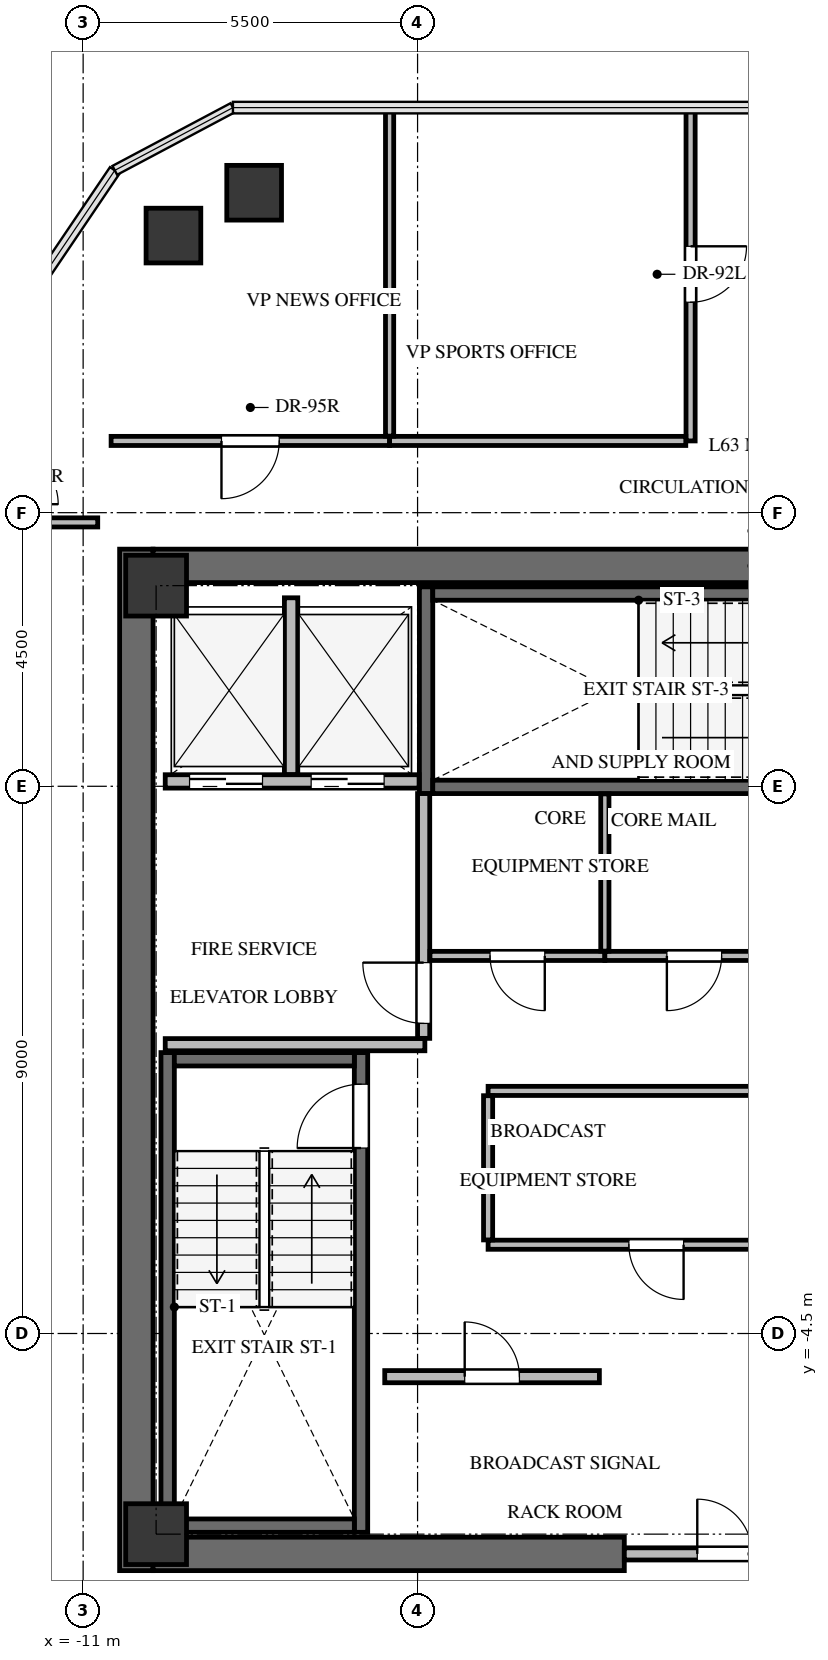
"""IFC4 building model, lengths in metres.
Left out: names, types, materials, properties, quantities, classifications, styles, units other than length and angle.
Written with IfcOpenShell. Run it as: python <this file> out.ifc"""

import sys

from ifc_helpers import new_model, si_unit, direction, frame, frame_2d, origin, origin_2d, place, context, subcontext, project, spatial, rectangle, extrude, source, transform, mapped, element, fill, save


model = new_model("IFC4")
c1 = context("Model", 3, precision=1e-05, world=origin(), true_north=direction((0.0, 1.0)))
c2 = subcontext(c1, "Body", "Model", "MODEL_VIEW")
j1 = project(units=[si_unit("LENGTHUNIT", "METRE"), si_unit("PLANEANGLEUNIT", "RADIAN")], contexts=[c1])
p1 = place(None, origin())
s1 = spatial("IfcSite", under=j1, at=p1, CompositionType="ELEMENT")
p2 = place(p1, origin())
s2 = spatial("IfcBuilding", under=s1, at=p2, CompositionType="ELEMENT")
p3 = place(p2, frame((0.0, 0.0, 228.2)))
s3 = spatial("IfcBuildingStorey", under=s2, at=p3, CompositionType="ELEMENT", Elevation=228.2)
p4 = place(p3, frame((-10.125, -8.4, 0.0), z_axis=(0.0, 0.0, 1.0), x_axis=(0.0, 1.0, 0.0)))
e1 = element("IfcWall", 1, at=p4, inside=s3, PredefinedType="SHEAR", context=c2, shape_type="SweptSolid", body=[
    extrude(rectangle(XDim=16.8, YDim=0.55, at=frame_2d((8.4, 0.0))), origin(), (0.0, 0.0, 1.0), 3.3),
])
p5 = place(p3, frame((-9.85, -8.125, 0.0), z_axis=(0.0, 0.0, 1.0), x_axis=(1.0, 0.0, 0.0)))
e2 = element("IfcWall", 2, at=p5, inside=s3, PredefinedType="SHEAR", context=c2, shape_type="SweptSolid", body=[
    extrude(rectangle(XDim=7.75, YDim=0.55, at=frame_2d((3.875, 0.0))), origin(), (0.0, 0.0, 1.0), 3.3),
])
p6 = place(p3, frame((-9.85, 8.125, 0.0), z_axis=(0.0, 0.0, 1.0), x_axis=(1.0, 0.0, 0.0)))
e3 = element("IfcWall", 3, at=p6, inside=s3, PredefinedType="SHEAR", context=c2, shape_type="SweptSolid", body=[
    extrude(rectangle(XDim=19.7, YDim=0.55, at=frame_2d((9.85, 0.0))), origin(), (0.0, 0.0, 1.0), 3.3),
])
p7 = place(p3, frame((-6.43, -7.77, -0.24), z_axis=(0.0, 0.0, 1.0), x_axis=(0.0, 1.0, 0.0)))
e4 = element("IfcWall", 4, at=p7, inside=s3, PredefinedType="SHEAR", context=c2, shape_type="SweptSolid", body=[
    extrude(rectangle(XDim=7.89, YDim=0.22, at=frame_2d((3.945, 0.0))), origin(), (0.0, 0.0, 1.0), 3.3),
])
p8 = place(p7, frame((6.32, 0.0, 0.0)))
e5 = element("IfcOpeningElement", 5, at=p8, cuts=e4, PredefinedType="OPENING", context=c2, shape_type="SweptSolid", body=[
    extrude(rectangle(XDim=1.05, YDim=2.15, at=frame_2d((0.525, 1.075))), frame((0.0, 0.12, 0.0), z_axis=(0.0, -1.0, 0.0), x_axis=(1.0, 0.0, 0.0)), (0.0, 0.0, 1.0), 0.24),
])
p9 = place(p3, frame((-9.61, 0.12, -0.24), z_axis=(0.0, 0.0, 1.0), x_axis=(0.0, -1.0, 0.0)))
e6 = element("IfcWall", 6, at=p9, inside=s3, PredefinedType="SHEAR", context=c2, shape_type="SweptSolid", body=[
    extrude(rectangle(XDim=7.89, YDim=0.22, at=frame_2d((3.945, 0.0))), origin(), (0.0, 0.0, 1.0), 3.3),
])
for number, where, z_axis, x_axis in (
    (7, (-9.5, -7.66, -0.24), (0.0, 0.0, 1.0), (1.0, 0.0, 0.0)),
    (8, (-6.54, 0.01, -0.24), (0.0, 0.0, 1.0), (-1.0, 0.0, 0.0)),
):
    element("IfcWall", number, at=place(p3, frame(where, z_axis=z_axis, x_axis=x_axis)), inside=s3, PredefinedType="SHEAR", context=c2, shape_type="SweptSolid", body=[
        extrude(rectangle(XDim=2.96, YDim=0.22, at=frame_2d((1.48, 0.0))), origin(), (0.0, 0.0, 1.0), 3.3),
    ])
p10 = place(p3, frame((-5.36, 7.78, -0.24), z_axis=(0.0, 0.0, 1.0), x_axis=(0.0, -1.0, 0.0)))
e9 = element("IfcWall", 9, at=p10, inside=s3, PredefinedType="SHEAR", context=c2, shape_type="SweptSolid", body=[
    extrude(rectangle(XDim=3.4, YDim=0.22, at=frame_2d((1.7, 0.0))), origin(), (0.0, 0.0, 1.0), 3.3),
])
p11 = place(p3, frame((-5.25, 4.49, -0.24), z_axis=(0.0, 0.0, 1.0), x_axis=(1.0, 0.0, 0.0)))
e10 = element("IfcWall", 10, at=p11, inside=s3, PredefinedType="SHEAR", context=c2, shape_type="SweptSolid", body=[
    extrude(rectangle(XDim=7.35, YDim=0.22, at=frame_2d((3.675, 0.0))), origin(), (0.0, 0.0, 1.0), 3.3),
])
p12 = place(p11, frame((5.85, 0.0, 0.0)))
e11 = element("IfcOpeningElement", 11, at=p12, cuts=e10, PredefinedType="OPENING", context=c2, shape_type="SweptSolid", body=[
    extrude(rectangle(XDim=1.05, YDim=2.15, at=frame_2d((0.525, 1.075))), frame((0.0, 0.12, 0.0), z_axis=(0.0, -1.0, 0.0), x_axis=(1.0, 0.0, 0.0)), (0.0, 0.0, 1.0), 0.24),
])
p13 = place(p3, frame((2.1, 7.67, -0.24), z_axis=(0.0, 0.0, 1.0), x_axis=(-1.0, 0.0, 0.0)))
e12 = element("IfcWall", 12, at=p13, inside=s3, PredefinedType="SHEAR", context=c2, shape_type="SweptSolid", body=[
    extrude(rectangle(XDim=7.35, YDim=0.22, at=frame_2d((3.675, 0.0))), origin(), (0.0, 0.0, 1.0), 3.3),
])
m1 = source(origin(), c2, "Body", "SweptSolid", [
    extrude(rectangle(XDim=1.0, YDim=1.0, at=origin_2d()), origin(), (0.0, 0.0, 1.0), 3.3),
])
for number, where, z_axis, x_axis in (
    (13, (-9.8, -7.8, -0.24), (0.0, 0.0, 1.0), (1.0, 0.0, 0.0)),
    (14, (-9.8, 7.8, -0.24), (0.0, 0.0, 1.0), (1.0, 0.0, 0.0)),
):
    element("IfcColumn", number, at=place(p3, frame(where, z_axis=z_axis, x_axis=x_axis)), inside=s3, PredefinedType="COLUMN", context=c2, shape_type="MappedRepresentation", body=[
        mapped(m1, transform((0.0, 0.0, 0.0), x_axis=(1.0, 0.0, 0.0), y_axis=(0.0, 1.0, 0.0), z_axis=(0.0, 0.0, 1.0), scale=1.0)),
    ])
m2 = source(origin(), c2, "Body", "SweptSolid", [
    extrude(rectangle(XDim=0.9, YDim=0.9, at=origin_2d()), origin(), (0.0, 0.0, 1.0), 3.3),
])
for number, where, z_axis, x_axis in (
    (15, (-9.515, 13.557, -0.24), (0.0, 0.0, 1.0), (1.0, 0.0, 0.0)),
    (16, (-8.188, 14.262, -0.24), (0.0, 0.0, 1.0), (1.0, 0.0, 0.0)),
):
    element("IfcColumn", number, at=place(p3, frame(where, z_axis=z_axis, x_axis=x_axis)), inside=s3, PredefinedType="COLUMN", context=c2, shape_type="MappedRepresentation", body=[
        mapped(m2, transform((0.0, 0.0, 0.0), x_axis=(1.0, 0.0, 0.0), y_axis=(0.0, 1.0, 0.0), z_axis=(0.0, 0.0, 1.0), scale=1.0)),
    ])
p14 = place(p3, frame((-2.1, -8.125, 0.0), z_axis=(0.0, 0.0, 1.0), x_axis=(1.0, 0.0, 0.0)))
e17 = element("IfcWall", 17, at=p14, inside=s3, PredefinedType="SOLIDWALL", context=c2, shape_type="SweptSolid", body=[
    extrude(rectangle(XDim=4.2, YDim=0.2, at=frame_2d((2.1, 0.0))), origin(), (0.0, 0.0, 1.0), 3.045),
])
p15 = place(p14, frame((1.2, 0.0, 0.0)))
e18 = element("IfcOpeningElement", 18, at=p15, cuts=e17, PredefinedType="OPENING", context=c2, shape_type="SweptSolid", body=[
    extrude(rectangle(XDim=1.8, YDim=2.15, at=frame_2d((0.9, 1.075))), frame((0.0, 0.11, 0.0), z_axis=(0.0, -1.0, 0.0), x_axis=(1.0, 0.0, 0.0)), (0.0, 0.0, 1.0), 0.22),
])
p16 = place(p3, frame((-9.65, 4.58, 0.0), z_axis=(0.0, 0.0, 1.0), x_axis=(1.0, 0.0, 0.0)))
e19 = element("IfcWall", 19, at=p16, inside=s3, PredefinedType="SOLIDWALL", context=c2, shape_type="SweptSolid", body=[
    extrude(rectangle(XDim=4.175, YDim=0.22, at=frame_2d((2.087, 0.0))), origin(), (0.0, 0.0, 1.0), 3.045),
])
p17 = place(p16, frame((0.4, 0.0, 0.0)))
e20 = element("IfcOpeningElement", 20, at=p17, cuts=e19, PredefinedType="OPENING", context=c2, shape_type="SweptSolid", body=[
    extrude(rectangle(XDim=1.2, YDim=2.15, at=frame_2d((0.6, 1.075))), frame((0.0, 0.12, 0.0), z_axis=(0.0, -1.0, 0.0), x_axis=(1.0, 0.0, 0.0)), (0.0, 0.0, 1.0), 0.24),
])
p18 = place(p16, frame((2.4, 0.0, 0.0)))
e21 = element("IfcOpeningElement", 21, at=p18, cuts=e19, PredefinedType="OPENING", context=c2, shape_type="SweptSolid", body=[
    extrude(rectangle(XDim=1.2, YDim=2.15, at=frame_2d((0.6, 1.075))), frame((0.0, 0.12, 0.0), z_axis=(0.0, -1.0, 0.0), x_axis=(1.0, 0.0, 0.0)), (0.0, 0.0, 1.0), 0.24),
])
p19 = place(p3, frame((-7.58, 4.694, 0.0), z_axis=(0.0, 0.0, 1.0), x_axis=(0.0, 1.0, 0.0)))
e22 = element("IfcWall", 22, at=p19, inside=s3, PredefinedType="SOLIDWALL", context=c2, shape_type="SweptSolid", body=[
    extrude(rectangle(XDim=2.906, YDim=0.22, at=frame_2d((1.453, 0.0))), origin(), (0.0, 0.0, 1.0), 3.045),
])
p20 = place(p3, frame((-9.65, 0.25, 0.0), z_axis=(0.0, 0.0, 1.0), x_axis=(1.0, 0.0, 0.0)))
e23 = element("IfcWall", 23, at=p20, inside=s3, PredefinedType="SOLIDWALL", context=c2, shape_type="SweptSolid", body=[
    extrude(rectangle(XDim=4.27, YDim=0.2, at=frame_2d((2.135, 0.0))), origin(), (0.0, 0.0, 1.0), 3.045),
])
p21 = place(p3, frame((-5.4, 0.354, 0.0), z_axis=(0.0, 0.0, 1.0), x_axis=(0.0, 1.0, 0.0)))
e24 = element("IfcWall", 24, at=p21, inside=s3, PredefinedType="SOLIDWALL", context=c2, shape_type="SweptSolid", body=[
    extrude(rectangle(XDim=4.026, YDim=0.2, at=frame_2d((2.013, 0.0))), origin(), (0.0, 0.0, 1.0), 3.045),
])
p22 = place(p21, frame((0.246, 0.0, 0.0)))
e25 = element("IfcOpeningElement", 25, at=p22, cuts=e24, PredefinedType="OPENING", context=c2, shape_type="SweptSolid", body=[
    extrude(rectangle(XDim=1.0, YDim=2.15, at=frame_2d((0.5, 1.075))), frame((0.0, 0.11, 0.0), z_axis=(0.0, -1.0, 0.0), x_axis=(1.0, 0.0, 0.0)), (0.0, 0.0, 1.0), 0.22),
])
p23 = place(p3, frame((-6.04, -5.21, 0.0), z_axis=(0.0, 0.0, 1.0), x_axis=(1.0, 0.0, 0.0)))
e26 = element("IfcWall", 26, at=p23, inside=s3, PredefinedType="SOLIDWALL", context=c2, shape_type="SweptSolid", body=[
    extrude(rectangle(XDim=3.53, YDim=0.2, at=frame_2d((1.765, 0.0))), origin(), (0.0, 0.0, 1.0), 3.045),
])
p24 = place(p23, frame((1.315, 0.0, 0.0)))
e27 = element("IfcOpeningElement", 27, at=p24, cuts=e26, PredefinedType="OPENING", context=c2, shape_type="SweptSolid", body=[
    extrude(rectangle(XDim=0.9, YDim=2.05, at=frame_2d((0.45, 1.025))), frame((0.0, 0.11, 0.0), z_axis=(0.0, -1.0, 0.0), x_axis=(1.0, 0.0, 0.0)), (0.0, 0.0, 1.0), 0.22),
])
p25 = place(p3, frame((1.19, -3.04, 0.0), z_axis=(0.0, 0.0, 1.0), x_axis=(-1.0, 0.0, 0.0)))
e28 = element("IfcWall", 28, at=p25, inside=s3, PredefinedType="PARTITIONING", context=c2, shape_type="SweptSolid", body=[
    extrude(rectangle(XDim=5.53, YDim=0.15, at=frame_2d((2.765, 0.0))), origin(), (0.0, 0.0, 1.0), 3.045),
])
p26 = place(p25, frame((2.315, 0.0, 0.0)))
e29 = element("IfcOpeningElement", 29, at=p26, cuts=e28, PredefinedType="OPENING", context=c2, shape_type="SweptSolid", body=[
    extrude(rectangle(XDim=0.9, YDim=2.05, at=frame_2d((0.45, 1.025))), frame((0.0, 0.085, 0.0), z_axis=(0.0, -1.0, 0.0), x_axis=(1.0, 0.0, 0.0)), (0.0, 0.0, 1.0), 0.17),
])
p27 = place(p3, frame((-4.34, -0.51, 0.0), z_axis=(0.0, 0.0, 1.0), x_axis=(1.0, 0.0, 0.0)))
e30 = element("IfcWall", 30, at=p27, inside=s3, PredefinedType="PARTITIONING", context=c2, shape_type="SweptSolid", body=[
    extrude(rectangle(XDim=5.53, YDim=0.15, at=frame_2d((2.765, 0.0))), origin(), (0.0, 0.0, 1.0), 3.045),
])
p28 = place(p3, frame((-4.34, -2.961, 0.0), z_axis=(0.0, 0.0, 1.0), x_axis=(0.0, 1.0, 0.0)))
e31 = element("IfcWall", 31, at=p28, inside=s3, PredefinedType="PARTITIONING", context=c2, shape_type="SweptSolid", body=[
    extrude(rectangle(XDim=2.372, YDim=0.15, at=frame_2d((1.186, 0.0))), origin(), (0.0, 0.0, 1.0), 3.045),
])
p29 = place(p3, frame((-2.42, 1.71, 0.0), z_axis=(0.0, 0.0, 1.0), x_axis=(-1.0, 0.0, 0.0)))
e32 = element("IfcWall", 32, at=p29, inside=s3, PredefinedType="PARTITIONING", context=c2, shape_type="SweptSolid", body=[
    extrude(rectangle(XDim=2.876, YDim=0.15, at=frame_2d((1.438, 0.0))), origin(), (0.0, 0.0, 1.0), 3.045),
])
p30 = place(p29, frame((0.988, 0.0, 0.0)))
e33 = element("IfcOpeningElement", 33, at=p30, cuts=e32, PredefinedType="OPENING", context=c2, shape_type="SweptSolid", body=[
    extrude(rectangle(XDim=0.9, YDim=2.05, at=frame_2d((0.45, 1.025))), frame((0.0, 0.085, 0.0), z_axis=(0.0, -1.0, 0.0), x_axis=(1.0, 0.0, 0.0)), (0.0, 0.0, 1.0), 0.17),
])
p31 = place(p3, frame((0.52, 1.71, 0.0), z_axis=(0.0, 0.0, 1.0), x_axis=(-1.0, 0.0, 0.0)))
e34 = element("IfcWall", 34, at=p31, inside=s3, PredefinedType="PARTITIONING", context=c2, shape_type="SweptSolid", body=[
    extrude(rectangle(XDim=2.94, YDim=0.15, at=frame_2d((1.47, 0.0))), origin(), (0.0, 0.0, 1.0), 3.045),
])
p32 = place(p31, frame((1.02, 0.0, 0.0)))
e35 = element("IfcOpeningElement", 35, at=p32, cuts=e34, PredefinedType="OPENING", context=c2, shape_type="SweptSolid", body=[
    extrude(rectangle(XDim=0.9, YDim=2.05, at=frame_2d((0.45, 1.025))), frame((0.0, 0.085, 0.0), z_axis=(0.0, -1.0, 0.0), x_axis=(1.0, 0.0, 0.0)), (0.0, 0.0, 1.0), 0.17),
])
p33 = place(p3, frame((-5.96, 10.18, 0.0), z_axis=(0.0, 0.0, 1.0), x_axis=(-1.0, 0.0, 0.0)))
e36 = element("IfcWall", 36, at=p33, inside=s3, PredefinedType="PARTITIONING", context=c2, shape_type="SweptSolid", body=[
    extrude(rectangle(XDim=4.58, YDim=0.15, at=frame_2d((2.29, 0.0))), origin(), (0.0, 0.0, 1.0), 2.301),
])
p34 = place(p33, frame((1.815, 0.0, 0.0)))
e37 = element("IfcOpeningElement", 37, at=p34, cuts=e36, PredefinedType="OPENING", context=c2, shape_type="SweptSolid", body=[
    extrude(rectangle(XDim=0.95, YDim=2.1, at=frame_2d((0.475, 1.05))), frame((0.0, 0.085, 0.0), z_axis=(0.0, -1.0, 0.0), x_axis=(1.0, 0.0, 0.0)), (0.0, 0.0, 1.0), 0.17),
])
p35 = place(p3, frame((-1.01, 15.662, 0.0), z_axis=(0.0, 0.0, 1.0), x_axis=(0.0, -1.0, 0.0)))
e38 = element("IfcWall", 38, at=p35, inside=s3, PredefinedType="PARTITIONING", context=c2, shape_type="SweptSolid", body=[
    extrude(rectangle(XDim=5.482, YDim=0.15, at=frame_2d((2.741, 0.0))), origin(), (0.0, 0.0, 1.0), 2.399),
])
p36 = place(p35, frame((2.281, 0.0, 0.0)))
e39 = element("IfcOpeningElement", 39, at=p36, cuts=e38, PredefinedType="OPENING", context=c2, shape_type="SweptSolid", body=[
    extrude(rectangle(XDim=0.92, YDim=2.1, at=frame_2d((0.46, 1.05))), frame((0.0, 0.085, 0.0), z_axis=(0.0, -1.0, 0.0), x_axis=(1.0, 0.0, 0.0)), (0.0, 0.0, 1.0), 0.17),
])
p37 = place(p3, frame((-1.089, 10.18, 0.0), z_axis=(0.0, 0.0, 1.0), x_axis=(-1.0, 0.0, 0.0)))
e40 = element("IfcWall", 40, at=p37, inside=s3, PredefinedType="PARTITIONING", context=c2, shape_type="SweptSolid", body=[
    extrude(rectangle(XDim=4.871, YDim=0.15, at=frame_2d((2.436, 0.0))), origin(), (0.0, 0.0, 1.0), 2.608),
])
p38 = place(p3, frame((-12.31, 8.84, 0.0), z_axis=(0.0, 0.0, 1.0), x_axis=(1.0, 0.0, 0.0)))
e41 = element("IfcWall", 41, at=p38, inside=s3, PredefinedType="PARTITIONING", context=c2, shape_type="SweptSolid", body=[
    extrude(rectangle(XDim=1.55, YDim=0.15, at=frame_2d((0.775, 0.0))), origin(), (0.0, 0.0, 1.0), 3.045),
])
p39 = place(p3, frame((-2.42, 4.375, 0.0), z_axis=(0.0, 0.0, 1.0), x_axis=(0.0, -1.0, 0.0)))
e42 = element("IfcWall", 42, at=p39, inside=s3, PredefinedType="PARTITIONING", context=c2, shape_type="SweptSolid", body=[
    extrude(rectangle(XDim=2.586, YDim=0.135, at=frame_2d((1.293, 0.0))), origin(), (0.0, 0.0, 1.0), 3.045),
])
p40 = place(p3, frame((-5.96, 15.662, 0.0), z_axis=(0.0, 0.0, 1.0), x_axis=(0.0, -1.0, 0.0)))
e43 = element("IfcWall", 43, at=p40, inside=s3, PredefinedType="PARTITIONING", context=c2, shape_type="SweptSolid", body=[
    extrude(rectangle(XDim=5.403, YDim=0.135, at=frame_2d((2.702, 0.0))), origin(), (0.0, 0.0, 1.0), 2.399),
])
m3 = source(origin(), c2, "Body", "SweptSolid", [
    extrude(rectangle(XDim=1.05, YDim=2.15, at=frame_2d((0.525, 1.075))), frame((0.0, 0.025, 0.0), z_axis=(0.0, -1.0, 0.0), x_axis=(1.0, 0.0, 0.0)), (0.0, 0.0, 1.0), 0.05),
])
p41 = place(p8, origin())
e44 = element("IfcDoor", 44, at=p41, inside=s3, OperationType="SINGLE_SWING_LEFT", PredefinedType="DOOR", context=c2, shape_type="MappedRepresentation", body=[
    mapped(m3, transform((0.0, 0.0, 0.0), x_axis=(1.0, 0.0, 0.0), y_axis=(0.0, 1.0, 0.0), z_axis=(0.0, 0.0, 1.0), scale=1.0)),
])
fill(e5, e44)
m4 = source(origin(), c2, "Body", "SweptSolid", [
    extrude(rectangle(XDim=1.8, YDim=2.15, at=frame_2d((0.9, 1.075))), frame((0.0, 0.025, 0.0), z_axis=(0.0, -1.0, 0.0), x_axis=(1.0, 0.0, 0.0)), (0.0, 0.0, 1.0), 0.05),
])
p42 = place(p15, origin())
e45 = element("IfcDoor", 45, at=p42, inside=s3, OperationType="DOUBLE_DOOR_SINGLE_SWING", PredefinedType="DOOR", context=c2, shape_type="MappedRepresentation", body=[
    mapped(m4, transform((0.0, 0.0, 0.0), x_axis=(1.0, 0.0, 0.0), y_axis=(0.0, 1.0, 0.0), z_axis=(0.0, 0.0, 1.0), scale=1.0)),
])
fill(e18, e45)
m5 = source(origin(), c2, "Body", "SweptSolid", [
    extrude(rectangle(XDim=1.2, YDim=2.15, at=frame_2d((0.6, 1.075))), frame((0.0, 0.025, 0.0), z_axis=(0.0, -1.0, 0.0), x_axis=(1.0, 0.0, 0.0)), (0.0, 0.0, 1.0), 0.05),
])
p43 = place(p17, origin())
e46 = element("IfcDoor", 46, at=p43, inside=s3, OperationType="DOUBLE_DOOR_SLIDING", PredefinedType="DOOR", context=c2, shape_type="MappedRepresentation", body=[
    mapped(m5, transform((0.0, 0.0, 0.0), x_axis=(1.0, 0.0, 0.0), y_axis=(0.0, 1.0, 0.0), z_axis=(0.0, 0.0, 1.0), scale=1.0)),
])
fill(e20, e46)
p44 = place(p18, origin())
e47 = element("IfcDoor", 47, at=p44, inside=s3, OperationType="DOUBLE_DOOR_SLIDING", PredefinedType="DOOR", context=c2, shape_type="MappedRepresentation", body=[
    mapped(m5, transform((0.0, 0.0, 0.0), x_axis=(1.0, 0.0, 0.0), y_axis=(0.0, 1.0, 0.0), z_axis=(0.0, 0.0, 1.0), scale=1.0)),
])
fill(e21, e47)
m6 = source(origin(), c2, "Body", "SweptSolid", [
    extrude(rectangle(XDim=1.0, YDim=2.15, at=frame_2d((0.5, 1.075))), frame((0.0, 0.025, 0.0), z_axis=(0.0, -1.0, 0.0), x_axis=(1.0, 0.0, 0.0)), (0.0, 0.0, 1.0), 0.05),
])
p45 = place(p22, origin())
e48 = element("IfcDoor", 48, at=p45, inside=s3, OperationType="SINGLE_SWING_RIGHT", PredefinedType="DOOR", context=c2, shape_type="MappedRepresentation", body=[
    mapped(m6, transform((0.0, 0.0, 0.0), x_axis=(1.0, 0.0, 0.0), y_axis=(0.0, 1.0, 0.0), z_axis=(0.0, 0.0, 1.0), scale=1.0)),
])
fill(e25, e48)
m7 = source(origin(), c2, "Body", "SweptSolid", [
    extrude(rectangle(XDim=0.9, YDim=2.05, at=frame_2d((0.45, 1.025))), frame((0.0, 0.025, 0.0), z_axis=(0.0, -1.0, 0.0), x_axis=(1.0, 0.0, 0.0)), (0.0, 0.0, 1.0), 0.05),
])
p46 = place(p24, origin())
e49 = element("IfcDoor", 49, at=p46, inside=s3, OperationType="SINGLE_SWING_LEFT", PredefinedType="DOOR", context=c2, shape_type="MappedRepresentation", body=[
    mapped(m7, transform((0.0, 0.0, 0.0), x_axis=(1.0, 0.0, 0.0), y_axis=(0.0, 1.0, 0.0), z_axis=(0.0, 0.0, 1.0), scale=1.0)),
])
fill(e27, e49)
p47 = place(p26, origin())
e50 = element("IfcDoor", 50, at=p47, inside=s3, OperationType="SINGLE_SWING_LEFT", PredefinedType="DOOR", context=c2, shape_type="MappedRepresentation", body=[
    mapped(m7, transform((0.0, 0.0, 0.0), x_axis=(1.0, 0.0, 0.0), y_axis=(0.0, 1.0, 0.0), z_axis=(0.0, 0.0, 1.0), scale=1.0)),
])
fill(e29, e50)
p48 = place(p30, origin())
e51 = element("IfcDoor", 51, at=p48, inside=s3, OperationType="SINGLE_SWING_LEFT", PredefinedType="DOOR", context=c2, shape_type="MappedRepresentation", body=[
    mapped(m7, transform((0.0, 0.0, 0.0), x_axis=(1.0, 0.0, 0.0), y_axis=(0.0, 1.0, 0.0), z_axis=(0.0, 0.0, 1.0), scale=1.0)),
])
fill(e33, e51)
m8 = source(origin(), c2, "Body", "SweptSolid", [
    extrude(rectangle(XDim=0.9, YDim=2.05, at=frame_2d((0.45, 1.025))), frame((0.0, 0.025, 0.0), z_axis=(0.0, -1.0, 0.0), x_axis=(1.0, 0.0, 0.0)), (0.0, 0.0, 1.0), 0.05),
])
p49 = place(p32, origin())
e52 = element("IfcDoor", 52, at=p49, inside=s3, OperationType="SINGLE_SWING_RIGHT", PredefinedType="DOOR", context=c2, shape_type="MappedRepresentation", body=[
    mapped(m8, transform((0.0, 0.0, 0.0), x_axis=(1.0, 0.0, 0.0), y_axis=(0.0, 1.0, 0.0), z_axis=(0.0, 0.0, 1.0), scale=1.0)),
])
fill(e35, e52)
m9 = source(origin(), c2, "Body", "SweptSolid", [
    extrude(rectangle(XDim=0.95, YDim=2.1, at=frame_2d((0.475, 1.05))), frame((0.0, 0.025, 0.0), z_axis=(0.0, -1.0, 0.0), x_axis=(1.0, 0.0, 0.0)), (0.0, 0.0, 1.0), 0.05),
])
p50 = place(p34, origin())
e53 = element("IfcDoor", 53, at=p50, inside=s3, OperationType="SINGLE_SWING_RIGHT", PredefinedType="DOOR", context=c2, shape_type="MappedRepresentation", body=[
    mapped(m9, transform((0.0, 0.0, 0.0), x_axis=(1.0, 0.0, 0.0), y_axis=(0.0, 1.0, 0.0), z_axis=(0.0, 0.0, 1.0), scale=1.0)),
])
fill(e37, e53)
m10 = source(origin(), c2, "Body", "SweptSolid", [
    extrude(rectangle(XDim=0.92, YDim=2.1, at=frame_2d((0.46, 1.05))), frame((0.0, 0.025, 0.0), z_axis=(0.0, -1.0, 0.0), x_axis=(1.0, 0.0, 0.0)), (0.0, 0.0, 1.0), 0.05),
])
p51 = place(p36, origin())
e54 = element("IfcDoor", 54, at=p51, inside=s3, OperationType="SINGLE_SWING_LEFT", PredefinedType="DOOR", context=c2, shape_type="MappedRepresentation", body=[
    mapped(m10, transform((0.0, 0.0, 0.0), x_axis=(1.0, 0.0, 0.0), y_axis=(0.0, 1.0, 0.0), z_axis=(0.0, 0.0, 1.0), scale=1.0)),
])
fill(e39, e54)
save(model, sys.argv[1])
